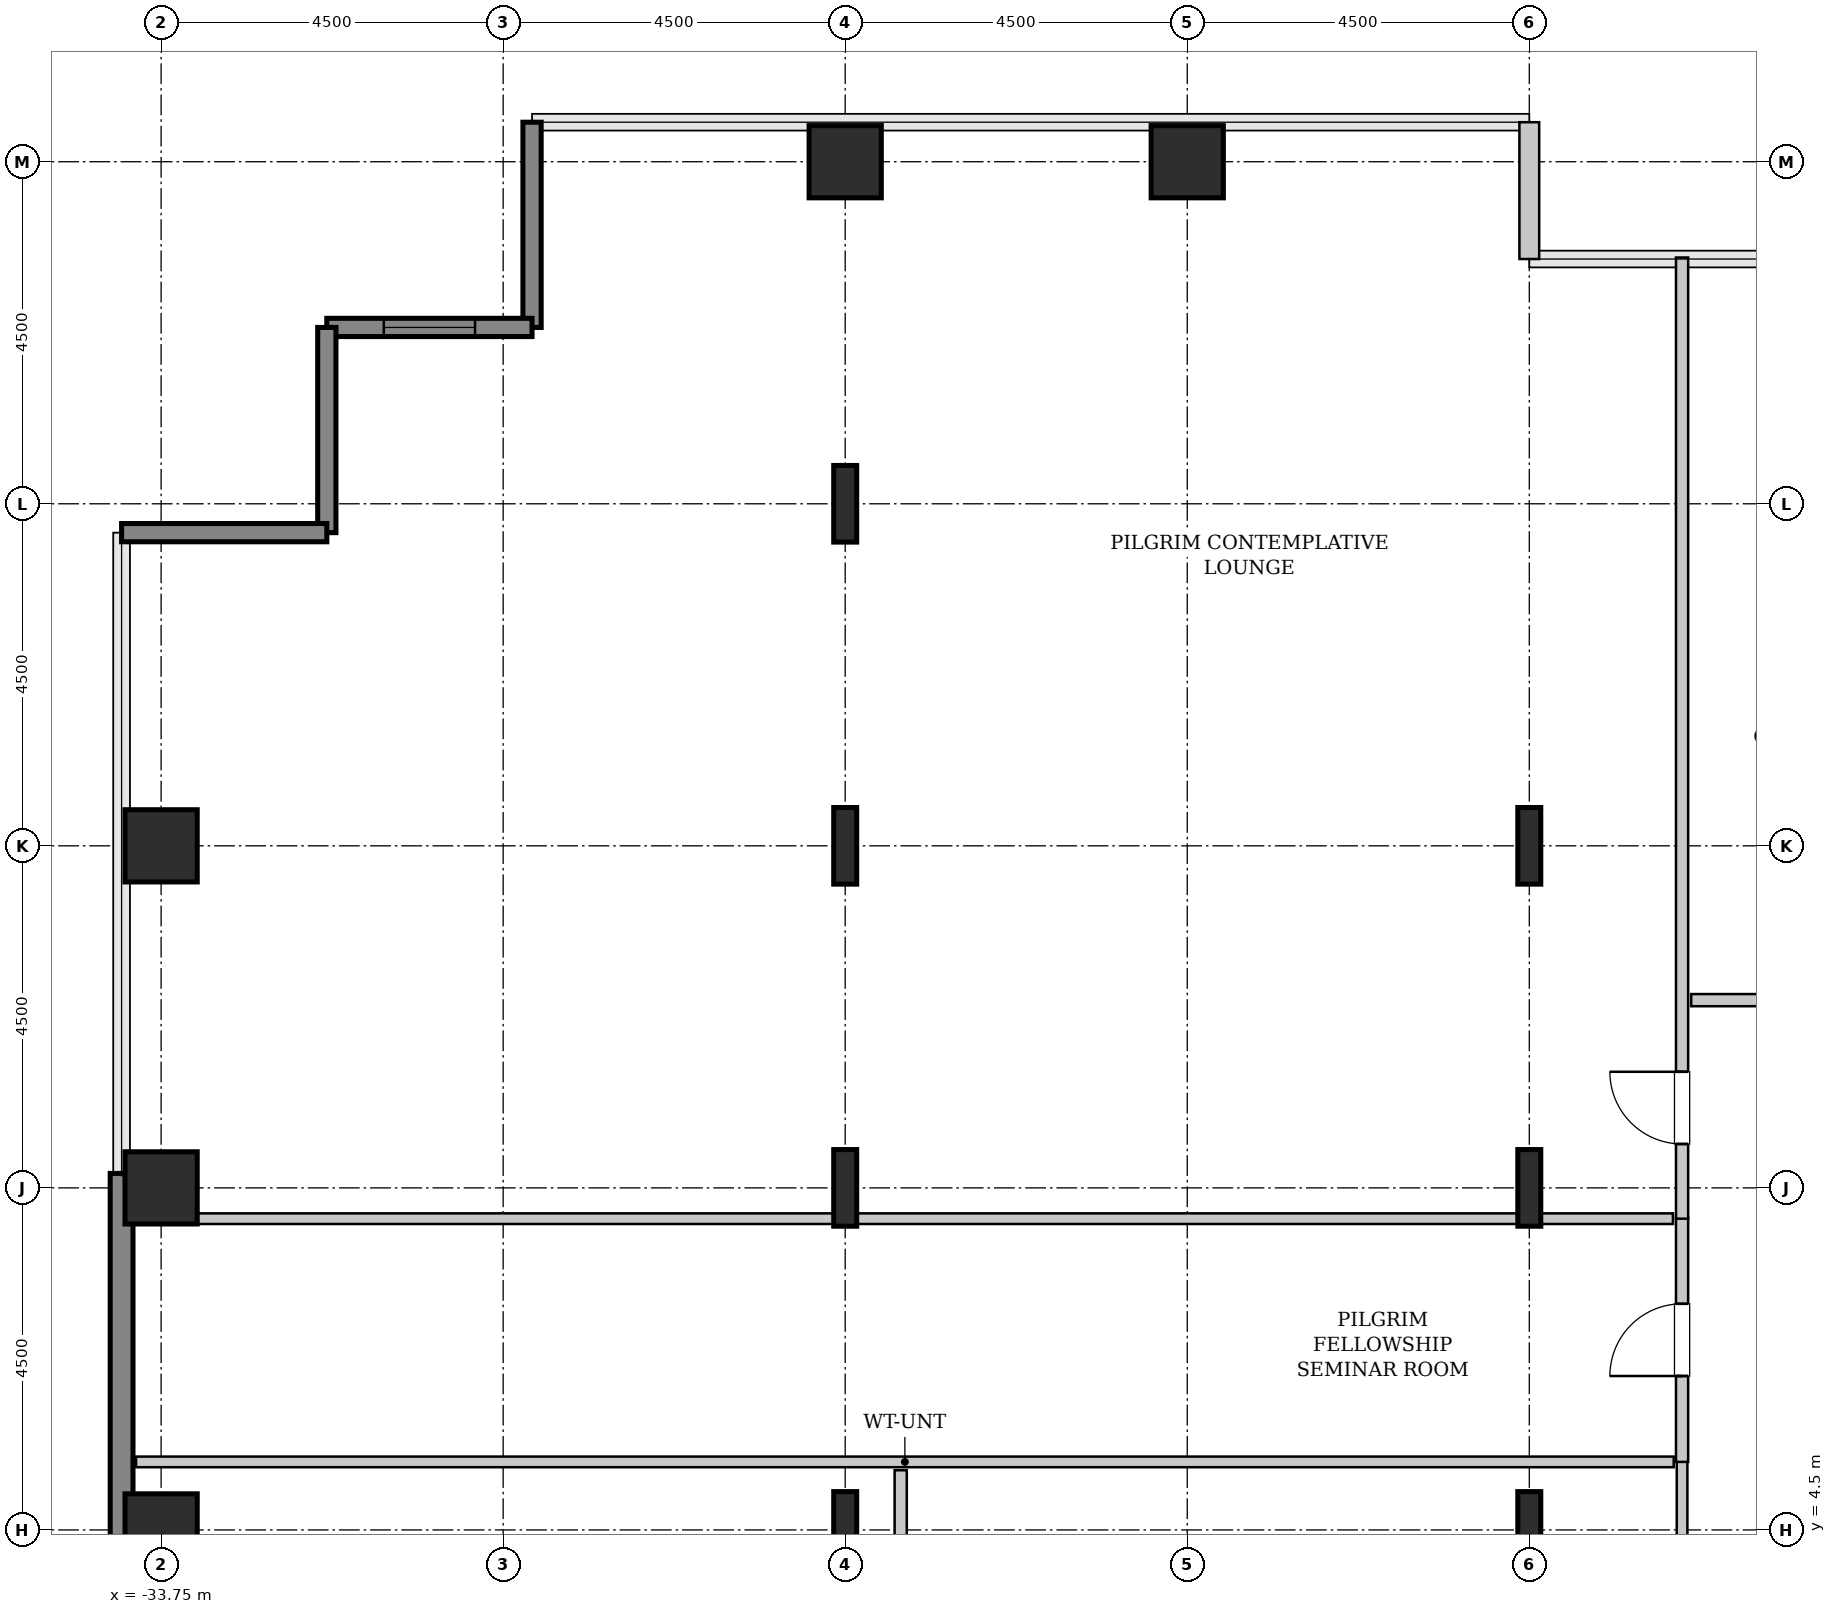
"""IFC4 building model, lengths in metres.
Left out: names, types, materials, properties, quantities, classifications, styles, units other than length and angle.
Written with IfcOpenShell. Run it as: python <this file> out.ifc"""

import sys

from ifc_helpers import new_model, si_unit, direction, frame, frame_2d, origin, origin_2d, place, context, subcontext, project, spatial, rectangle, hollow_rectangle, i_section, extrude, source, transform, mapped, element, fill, save


model = new_model("IFC4")
c1 = context("Model", 3, precision=1e-05, world=origin(), true_north=direction((0.0, 1.0)))
c2 = subcontext(c1, "Body", "Model", "MODEL_VIEW")
j1 = project(units=[si_unit("LENGTHUNIT", "METRE"), si_unit("PLANEANGLEUNIT", "RADIAN")], contexts=[c1])
p1 = place(None, origin())
s1 = spatial("IfcSite", under=j1, at=p1, CompositionType="ELEMENT")
p2 = place(p1, origin())
s2 = spatial("IfcBuilding", under=s1, at=p2, CompositionType="ELEMENT")
p3 = place(p2, frame((0.0, 0.0, 67.2)))
s3 = spatial("IfcBuildingStorey", under=s2, at=p3, CompositionType="ELEMENT", Elevation=67.2)
m1 = source(origin(), c2, "Body", "SweptSolid", [
    extrude(hollow_rectangle(XDim=0.95, YDim=0.95, WallThickness=0.045, InnerFilletRadius=0.045, OuterFilletRadius=0.09, at=origin_2d()), origin(), (0.0, 0.0, 1.0), 3.8),
])
for number, where, z_axis, x_axis in (
    (1, (-33.75, 4.5, 0.0), (0.0, 0.0, 1.0), (1.0, 0.0, 0.0)),
    (2, (-33.75, 9.0, 0.0), (0.0, 0.0, 1.0), (1.0, 0.0, 0.0)),
    (3, (-33.75, 13.5, 0.0), (0.0, 0.0, 1.0), (1.0, 0.0, 0.0)),
):
    element("IfcColumn", number, at=place(p3, frame(where, z_axis=z_axis, x_axis=x_axis)), inside=s3, PredefinedType="COLUMN", context=c2, shape_type="MappedRepresentation", body=[
        mapped(m1, transform((0.0, 0.0, 0.0), x_axis=(1.0, 0.0, 0.0), y_axis=(0.0, 1.0, 0.0), z_axis=(0.0, 0.0, 1.0), scale=1.0)),
    ])
m2 = source(origin(), c2, "Body", "SweptSolid", [
    extrude(i_section(OverallWidth=0.302, OverallDepth=1.008, WebThickness=0.021, FlangeThickness=0.04, FilletRadius=0.03, at=origin_2d()), origin(), (0.0, 0.0, 1.0), 3.8),
])
for number, where, z_axis, x_axis in (
    (4, (-24.75, 4.5, 0.0), (0.0, 0.0, 1.0), (1.0, 0.0, 0.0)),
    (5, (-24.75, 9.0, 0.0), (0.0, 0.0, 1.0), (1.0, 0.0, 0.0)),
    (6, (-24.75, 13.5, 0.0), (0.0, 0.0, 1.0), (1.0, 0.0, 0.0)),
    (7, (-24.75, 18.0, 0.0), (0.0, 0.0, 1.0), (1.0, 0.0, 0.0)),
):
    element("IfcColumn", number, at=place(p3, frame(where, z_axis=z_axis, x_axis=x_axis)), inside=s3, PredefinedType="COLUMN", context=c2, shape_type="MappedRepresentation", body=[
        mapped(m2, transform((0.0, 0.0, 0.0), x_axis=(1.0, 0.0, 0.0), y_axis=(0.0, 1.0, 0.0), z_axis=(0.0, 0.0, 1.0), scale=1.0)),
    ])
for number, where, z_axis, x_axis in (
    (8, (-24.75, 22.5, 0.0), (0.0, 0.0, 1.0), (1.0, 0.0, 0.0)),
    (9, (-20.25, 22.5, 0.0), (0.0, 0.0, 1.0), (1.0, 0.0, 0.0)),
):
    element("IfcColumn", number, at=place(p3, frame(where, z_axis=z_axis, x_axis=x_axis)), inside=s3, PredefinedType="COLUMN", context=c2, shape_type="MappedRepresentation", body=[
        mapped(m1, transform((0.0, 0.0, 0.0), x_axis=(1.0, 0.0, 0.0), y_axis=(0.0, 1.0, 0.0), z_axis=(0.0, 0.0, 1.0), scale=1.0)),
    ])
for number, where, z_axis, x_axis in (
    (10, (-15.75, 4.5, 0.0), (0.0, 0.0, 1.0), (1.0, 0.0, 0.0)),
    (11, (-15.75, 9.0, 0.0), (0.0, 0.0, 1.0), (1.0, 0.0, 0.0)),
    (12, (-15.75, 13.5, 0.0), (0.0, 0.0, 1.0), (1.0, 0.0, 0.0)),
):
    element("IfcColumn", number, at=place(p3, frame(where, z_axis=z_axis, x_axis=x_axis)), inside=s3, PredefinedType="COLUMN", context=c2, shape_type="MappedRepresentation", body=[
        mapped(m2, transform((0.0, 0.0, 0.0), x_axis=(1.0, 0.0, 0.0), y_axis=(0.0, 1.0, 0.0), z_axis=(0.0, 0.0, 1.0), scale=1.0)),
    ])
m3 = source(origin(), c2, "Body", "SweptSolid", [
    extrude(rectangle(XDim=4.88, YDim=0.3, at=frame_2d((2.44, 0.0))), origin(), (0.0, 0.0, 1.0), 3.55),
])
p4 = place(p3, frame((-34.27, 4.31, 0.0), z_axis=(0.0, 0.0, 1.0), x_axis=(0.0, 1.0, 0.0)))
e13 = element("IfcWall", 13, at=p4, inside=s3, PredefinedType="SHEAR", context=c2, shape_type="MappedRepresentation", body=[
    mapped(m3, transform((0.0, 0.0, 0.0), x_axis=(1.0, 0.0, 0.0), y_axis=(0.0, 1.0, 0.0), z_axis=(0.0, 0.0, 1.0), scale=1.0)),
])
m4 = source(origin(), c2, "Body", "SweptSolid", [
    extrude(rectangle(XDim=1.8, YDim=0.26, at=frame_2d((0.9, 0.0))), origin(), (0.0, 0.0, 1.0), 3.55),
])
p5 = place(p3, frame((-15.75, 21.22, 0.0), z_axis=(0.0, 0.0, 1.0), x_axis=(0.0, 1.0, 0.0)))
e14 = element("IfcWall", 14, at=p5, inside=s3, PredefinedType="SOLIDWALL", context=c2, shape_type="MappedRepresentation", body=[
    mapped(m4, transform((0.0, 0.0, 0.0), x_axis=(1.0, 0.0, 0.0), y_axis=(0.0, 1.0, 0.0), z_axis=(0.0, 0.0, 1.0), scale=1.0)),
])
m5 = source(origin(), c2, "Body", "SweptSolid", [
    extrude(rectangle(XDim=2.7, YDim=0.24, at=frame_2d((1.35, 0.0))), origin(), (0.0, 0.0, 1.0), 3.55),
])
p6 = place(p3, frame((-28.87, 23.02, 0.0), z_axis=(0.0, 0.0, 1.0), x_axis=(0.0, -1.0, 0.0)))
e15 = element("IfcWall", 15, at=p6, inside=s3, PredefinedType="SHEAR", context=c2, shape_type="MappedRepresentation", body=[
    mapped(m5, transform((0.0, 0.0, 0.0), x_axis=(1.0, 0.0, 0.0), y_axis=(0.0, 1.0, 0.0), z_axis=(0.0, 0.0, 1.0), scale=1.0)),
])
p7 = place(p3, frame((-28.87, 20.32, 0.0), z_axis=(0.0, 0.0, 1.0), x_axis=(-1.0, 0.0, 0.0)))
e16 = element("IfcWall", 16, at=p7, inside=s3, PredefinedType="SHEAR", context=c2, shape_type="MappedRepresentation", body=[
    mapped(m5, transform((0.0, 0.0, 0.0), x_axis=(1.0, 0.0, 0.0), y_axis=(0.0, 1.0, 0.0), z_axis=(0.0, 0.0, 1.0), scale=1.0)),
])
p8 = place(p7, frame((0.75, 0.0, 0.85)))
e17 = element("IfcOpeningElement", 17, at=p8, cuts=e16, PredefinedType="OPENING", context=c2, shape_type="SweptSolid", body=[
    extrude(rectangle(XDim=1.2, YDim=1.8, at=frame_2d((0.6, 0.9))), frame((0.0, 0.13, 0.0), z_axis=(0.0, -1.0, 0.0), x_axis=(1.0, 0.0, 0.0)), (0.0, 0.0, 1.0), 0.26),
])
for number, where, z_axis, x_axis in (
    (18, (-31.57, 20.32, 0.0), (0.0, 0.0, 1.0), (0.0, -1.0, 0.0)),
    (19, (-31.57, 17.62, 0.0), (0.0, 0.0, 1.0), (-1.0, 0.0, 0.0)),
):
    element("IfcWall", number, at=place(p3, frame(where, z_axis=z_axis, x_axis=x_axis)), inside=s3, PredefinedType="SHEAR", context=c2, shape_type="MappedRepresentation", body=[
        mapped(m5, transform((0.0, 0.0, 0.0), x_axis=(1.0, 0.0, 0.0), y_axis=(0.0, 1.0, 0.0), z_axis=(0.0, 0.0, 1.0), scale=1.0)),
    ])
m6 = source(origin(), c2, "Body", "SweptSolid", [
    extrude(rectangle(XDim=6.665, YDim=0.14, at=frame_2d((3.333, 0.0))), origin(), (0.0, 0.0, 1.0), 3.535),
])
p9 = place(p3, frame((-13.74, -1.26, 0.0), z_axis=(0.0, 0.0, 1.0), x_axis=(0.0, 1.0, 0.0)))
e20 = element("IfcWall", 20, at=p9, inside=s3, PredefinedType="PARTITIONING", context=c2, shape_type="MappedRepresentation", body=[
    mapped(m6, transform((0.0, 0.0, 0.0), x_axis=(1.0, 0.0, 0.0), y_axis=(0.0, 1.0, 0.0), z_axis=(0.0, 0.0, 1.0), scale=1.0)),
])
m7 = source(origin(), c2, "Body", "SweptSolid", [
    extrude(rectangle(XDim=20.23, YDim=0.14, at=frame_2d((10.115, 0.0))), origin(), (0.0, 0.0, 1.0), 3.535),
])
p10 = place(p3, frame((-34.08, 5.395, 0.0), z_axis=(0.0, 0.0, 1.0), x_axis=(1.0, 0.0, 0.0)))
e21 = element("IfcWall", 21, at=p10, inside=s3, PredefinedType="PARTITIONING", context=c2, shape_type="MappedRepresentation", body=[
    mapped(m7, transform((0.0, 0.0, 0.0), x_axis=(1.0, 0.0, 0.0), y_axis=(0.0, 1.0, 0.0), z_axis=(0.0, 0.0, 1.0), scale=1.0)),
])
m8 = source(origin(), c2, "Body", "SweptSolid", [
    extrude(rectangle(XDim=10.58, YDim=0.16, at=frame_2d((5.29, 0.0))), origin(), (0.0, 0.0, 1.0), 3.535),
])
p11 = place(p3, frame((-24.02, -5.295, 0.0), z_axis=(0.0, 0.0, 1.0), x_axis=(0.0, 1.0, 0.0)))
e22 = element("IfcWall", 22, at=p11, inside=s3, PredefinedType="PARTITIONING", context=c2, shape_type="MappedRepresentation", body=[
    mapped(m8, transform((0.0, 0.0, 0.0), x_axis=(1.0, 0.0, 0.0), y_axis=(0.0, 1.0, 0.0), z_axis=(0.0, 0.0, 1.0), scale=1.0)),
])
p12 = place(p11, frame((2.57, 0.0, 0.0)))
e23 = element("IfcOpeningElement", 23, at=p12, cuts=e22, PredefinedType="OPENING", context=c2, shape_type="SweptSolid", body=[
    extrude(rectangle(XDim=0.95, YDim=2.1, at=frame_2d((0.475, 1.05))), frame((0.0, 0.09, 0.0), z_axis=(0.0, -1.0, 0.0), x_axis=(1.0, 0.0, 0.0)), (0.0, 0.0, 1.0), 0.18),
])
m9 = source(origin(), c2, "Body", "SweptSolid", [
    extrude(rectangle(XDim=3.21, YDim=0.16, at=frame_2d((1.605, 0.0))), origin(), (0.0, 0.0, 1.0), 3.535),
])
p13 = place(p3, frame((-13.74, 5.395, 0.0), z_axis=(0.0, 0.0, 1.0), x_axis=(0.0, 1.0, 0.0)))
e24 = element("IfcWall", 24, at=p13, inside=s3, PredefinedType="PARTITIONING", context=c2, shape_type="MappedRepresentation", body=[
    mapped(m9, transform((0.0, 0.0, 0.0), x_axis=(1.0, 0.0, 0.0), y_axis=(0.0, 1.0, 0.0), z_axis=(0.0, 0.0, 1.0), scale=1.0)),
])
p14 = place(p13, frame((1.13, 0.0, 0.0)))
e25 = element("IfcOpeningElement", 25, at=p14, cuts=e24, PredefinedType="OPENING", context=c2, shape_type="SweptSolid", body=[
    extrude(rectangle(XDim=0.95, YDim=2.1, at=frame_2d((0.475, 1.05))), frame((0.0, 0.09, 0.0), z_axis=(0.0, -1.0, 0.0), x_axis=(1.0, 0.0, 0.0)), (0.0, 0.0, 1.0), 0.18),
])
m10 = source(origin(), c2, "Body", "SweptSolid", [
    extrude(rectangle(XDim=20.22, YDim=0.14, at=frame_2d((10.11, 0.0))), origin(), (0.0, 0.0, 1.0), 2.825),
])
p15 = place(p3, frame((-34.08, 8.595, 0.0), z_axis=(0.0, 0.0, 1.0), x_axis=(1.0, 0.0, 0.0)))
e26 = element("IfcWall", 26, at=p15, inside=s3, PredefinedType="PARTITIONING", context=c2, shape_type="MappedRepresentation", body=[
    mapped(m10, transform((0.0, 0.0, 0.0), x_axis=(1.0, 0.0, 0.0), y_axis=(0.0, 1.0, 0.0), z_axis=(0.0, 0.0, 1.0), scale=1.0)),
])
m11 = source(origin(), c2, "Body", "SweptSolid", [
    extrude(rectangle(XDim=12.645, YDim=0.16, at=frame_2d((6.323, 0.0))), origin(), (0.0, 0.0, 1.0), 3.535),
])
p16 = place(p3, frame((-13.74, 8.595, 0.0), z_axis=(0.0, 0.0, 1.0), x_axis=(0.0, 1.0, 0.0)))
e27 = element("IfcWall", 27, at=p16, inside=s3, PredefinedType="PARTITIONING", context=c2, shape_type="MappedRepresentation", body=[
    mapped(m11, transform((0.0, 0.0, 0.0), x_axis=(1.0, 0.0, 0.0), y_axis=(0.0, 1.0, 0.0), z_axis=(0.0, 0.0, 1.0), scale=1.0)),
])
p17 = place(p16, frame((0.982, 0.0, 0.0)))
e28 = element("IfcOpeningElement", 28, at=p17, cuts=e27, PredefinedType="OPENING", context=c2, shape_type="SweptSolid", body=[
    extrude(rectangle(XDim=0.95, YDim=2.1, at=frame_2d((0.475, 1.05))), frame((0.0, 0.09, 0.0), z_axis=(0.0, -1.0, 0.0), x_axis=(1.0, 0.0, 0.0)), (0.0, 0.0, 1.0), 0.18),
])
m12 = source(origin(), c2, "Body", "SweptSolid", [
    extrude(rectangle(XDim=4.125, YDim=0.16, at=frame_2d((2.062, 0.0))), origin(), (0.0, 0.0, 1.0), 3.535),
])
p18 = place(p3, frame((-13.62, 11.47, 0.0), z_axis=(0.0, 0.0, 1.0), x_axis=(1.0, 0.0, 0.0)))
e29 = element("IfcWall", 29, at=p18, inside=s3, PredefinedType="PARTITIONING", context=c2, shape_type="MappedRepresentation", body=[
    mapped(m12, transform((0.0, 0.0, 0.0), x_axis=(1.0, 0.0, 0.0), y_axis=(0.0, 1.0, 0.0), z_axis=(0.0, 0.0, 1.0), scale=1.0)),
])
p19 = place(p18, frame((1.587, 0.0, 0.0)))
e30 = element("IfcOpeningElement", 30, at=p19, cuts=e29, PredefinedType="OPENING", context=c2, shape_type="SweptSolid", body=[
    extrude(rectangle(XDim=0.95, YDim=2.1, at=frame_2d((0.475, 1.05))), frame((0.0, 0.09, 0.0), z_axis=(0.0, -1.0, 0.0), x_axis=(1.0, 0.0, 0.0)), (0.0, 0.0, 1.0), 0.18),
])
m13 = source(origin(), c2, "Body", "SweptSolid", [
    extrude(rectangle(XDim=1.2, YDim=1.8, at=frame_2d((0.6, 0.9))), frame((0.0, 0.03, 0.0), z_axis=(0.0, -1.0, 0.0), x_axis=(1.0, 0.0, 0.0)), (0.0, 0.0, 1.0), 0.06),
])
p20 = place(p8, origin())
e31 = element("IfcWindow", 31, at=p20, inside=s3, PartitioningType="SINGLE_PANEL", PredefinedType="WINDOW", context=c2, shape_type="MappedRepresentation", body=[
    mapped(m13, transform((0.0, 0.0, 0.0), x_axis=(1.0, 0.0, 0.0), y_axis=(0.0, 1.0, 0.0), z_axis=(0.0, 0.0, 1.0), scale=1.0)),
])
fill(e17, e31)
m14 = source(origin(), c2, "Body", "SweptSolid", [
    extrude(rectangle(XDim=0.95, YDim=2.1, at=frame_2d((0.475, 1.05))), frame((0.0, 0.025, 0.0), z_axis=(0.0, -1.0, 0.0), x_axis=(1.0, 0.0, 0.0)), (0.0, 0.0, 1.0), 0.05),
])
p21 = place(p14, origin())
e32 = element("IfcDoor", 32, at=p21, inside=s3, OperationType="SINGLE_SWING_LEFT", PredefinedType="DOOR", context=c2, shape_type="MappedRepresentation", body=[
    mapped(m14, transform((0.0, 0.0, 0.0), x_axis=(1.0, 0.0, 0.0), y_axis=(0.0, 1.0, 0.0), z_axis=(0.0, 0.0, 1.0), scale=1.0)),
])
fill(e25, e32)
p22 = place(p17, origin())
e33 = element("IfcDoor", 33, at=p22, inside=s3, OperationType="SINGLE_SWING_RIGHT", PredefinedType="DOOR", context=c2, shape_type="MappedRepresentation", body=[
    mapped(m14, transform((0.0, 0.0, 0.0), x_axis=(1.0, 0.0, 0.0), y_axis=(0.0, 1.0, 0.0), z_axis=(0.0, 0.0, 1.0), scale=1.0)),
])
fill(e28, e33)
save(model, sys.argv[1])
